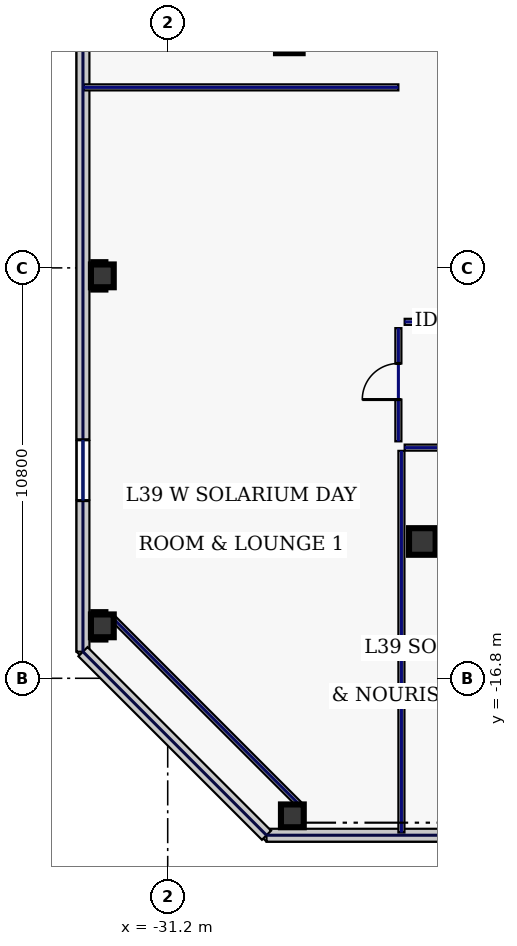
"""IFC4 building model, lengths in metres.
Left out: names, types, materials, properties, quantities, classifications, styles, units other than length and angle.
Written with IfcOpenShell. Run it as: python <this file> out.ifc"""

import sys

from ifc_helpers import new_model, si_unit, direction, frame, frame_2d, origin, origin_2d, place, context, subcontext, project, spatial, rectangle, hollow_rectangle, extrude, element, fill, save


model = new_model("IFC4")
c1 = context("Model", 3, precision=1e-05, world=origin(), true_north=direction((0.0, 1.0)))
c2 = subcontext(c1, "Body", "Model", "MODEL_VIEW")
j1 = project(units=[si_unit("LENGTHUNIT", "METRE"), si_unit("PLANEANGLEUNIT", "RADIAN")], contexts=[c1])
p1 = place(None, origin())
s1 = spatial("IfcSite", under=j1, at=p1, CompositionType="ELEMENT")
p2 = place(p1, origin())
s2 = spatial("IfcBuilding", under=s1, at=p2, CompositionType="ELEMENT")
p3 = place(p2, frame((0.0, 0.0, 172.2)))
s3 = spatial("IfcBuildingStorey", under=s2, at=p3, CompositionType="ELEMENT", Elevation=172.2)
for number, where, z_axis, x_axis in (
    (1, (-24.5, -13.2, 0.0), (0.0, 0.0, 1.0), (1.0, 0.0, 0.0)),
    (2, (-28.0, 0.0, 0.0), (0.0, 0.0, 1.0), (1.0, 0.0, 0.0)),
):
    element("IfcColumn", number, at=place(p3, frame(where, z_axis=z_axis, x_axis=x_axis)), inside=s3, PredefinedType="COLUMN", context=c2, shape_type="SweptSolid", body=[
        extrude(hollow_rectangle(XDim=0.7, YDim=0.7, WallThickness=0.032, at=origin_2d()), origin(), (0.0, 0.0, 1.0), 3.74),
    ])
for number, where, z_axis, x_axis in (
    (3, (-27.92, -20.42, 0.0), (0.0, 0.0, 1.0), (1.0, 0.0, 0.0)),
    (4, (-32.92, -6.21, 0.0), (0.0, 0.0, 1.0), (1.0, 0.0, 0.0)),
    (5, (-32.92, -15.42, 0.0), (0.0, 0.0, 1.0), (1.0, 0.0, 0.0)),
):
    element("IfcColumn", number, at=place(p3, frame(where, z_axis=z_axis, x_axis=x_axis)), inside=s3, PredefinedType="COLUMN", context=c2, shape_type="SweptSolid", body=[
        extrude(hollow_rectangle(XDim=0.6, YDim=0.6, WallThickness=0.028, at=origin_2d()), origin(), (0.0, 0.0, 1.0), 3.74),
    ])
p4 = place(p3, frame((-28.6, -20.93, 0.0), z_axis=(0.0, 0.0, 1.0), x_axis=(1.0, 0.0, 0.0)))
e6 = element("IfcWall", 6, at=p4, inside=s3, PredefinedType="STANDARD", context=c2, shape_type="SweptSolid", body=[
    extrude(rectangle(XDim=19.937, YDim=0.34, at=frame_2d((9.969, 0.0))), origin(), (0.0, 0.0, 1.0), 3.74),
])
p5 = place(p4, frame((10.882, 0.0, 0.22)))
e7 = element("IfcOpeningElement", 7, at=p5, cuts=e6, PredefinedType="OPENING", context=c2, shape_type="SweptSolid", body=[
    extrude(rectangle(XDim=1.6, YDim=1.2, at=frame_2d((0.8, 0.6))), frame((0.0, 0.18, 0.0), z_axis=(0.0, -1.0, 0.0), x_axis=(1.0, 0.0, 0.0)), (0.0, 0.0, 1.0), 0.36),
])
p6 = place(p3, frame((-33.43, 22.1, 0.0), z_axis=(0.0, 0.0, 1.0), x_axis=(0.0, -1.0, 0.0)))
e8 = element("IfcWall", 8, at=p6, inside=s3, PredefinedType="STANDARD", context=c2, shape_type="SweptSolid", body=[
    extrude(rectangle(XDim=38.2, YDim=0.34, at=frame_2d((19.1, 0.0))), origin(), (0.0, 0.0, 1.0), 3.74),
])
p7 = place(p6, frame((3.975, 0.0, 0.22)))
e9 = element("IfcOpeningElement", 9, at=p7, cuts=e8, PredefinedType="OPENING", context=c2, shape_type="SweptSolid", body=[
    extrude(rectangle(XDim=1.6, YDim=1.2, at=frame_2d((0.8, 0.6))), frame((0.0, 0.18, 0.0), z_axis=(0.0, -1.0, 0.0), x_axis=(1.0, 0.0, 0.0)), (0.0, 0.0, 1.0), 0.36),
])
p8 = place(p6, frame((13.525, 0.0, 0.22)))
e10 = element("IfcOpeningElement", 10, at=p8, cuts=e8, PredefinedType="OPENING", context=c2, shape_type="SweptSolid", body=[
    extrude(rectangle(XDim=1.6, YDim=1.2, at=frame_2d((0.8, 0.6))), frame((0.0, 0.18, 0.0), z_axis=(0.0, -1.0, 0.0), x_axis=(1.0, 0.0, 0.0)), (0.0, 0.0, 1.0), 0.36),
])
p9 = place(p6, frame((32.625, 0.0, 0.22)))
e11 = element("IfcOpeningElement", 11, at=p9, cuts=e8, PredefinedType="OPENING", context=c2, shape_type="SweptSolid", body=[
    extrude(rectangle(XDim=1.6, YDim=1.2, at=frame_2d((0.8, 0.6))), frame((0.0, 0.18, 0.0), z_axis=(0.0, -1.0, 0.0), x_axis=(1.0, 0.0, 0.0)), (0.0, 0.0, 1.0), 0.36),
])
p10 = place(p3, frame((-33.43, -16.1, 0.0), z_axis=(0.0, 0.0, 1.0), x_axis=(0.707106781187, -0.707106781187, 0.0)))
e12 = element("IfcWall", 12, at=p10, inside=s3, PredefinedType="STANDARD", context=c2, shape_type="SweptSolid", body=[
    extrude(rectangle(XDim=6.83, YDim=0.34, at=frame_2d((3.415, 0.0))), origin(), (0.0, 0.0, 1.0), 3.74),
])
p11 = place(p3, frame((-32.68, -15.18, 0.0), z_axis=(0.0, 0.0, 1.0), x_axis=(0.707106781187, -0.707106781187, 0.0)))
e13 = element("IfcWall", 13, at=p11, inside=s3, PredefinedType="PARTITIONING", context=c2, shape_type="SweptSolid", body=[
    extrude(rectangle(XDim=7.071, YDim=0.16, at=frame_2d((3.536, 0.0))), origin(), (0.0, 0.0, 1.0), 1.535),
])
p12 = place(p3, frame((-25.13, -10.565, 0.0), z_axis=(0.0, 0.0, 1.0), x_axis=(0.0, 1.0, 0.0)))
e14 = element("IfcWall", 14, at=p12, inside=s3, PredefinedType="PARTITIONING", context=c2, shape_type="SweptSolid", body=[
    extrude(rectangle(XDim=2.98, YDim=0.16, at=frame_2d((1.49, 0.0))), origin(), (0.0, 0.0, 1.0), 3.74),
])
p13 = place(p12, frame((1.1, 0.0, 0.0)))
e15 = element("IfcOpeningElement", 15, at=p13, cuts=e14, PredefinedType="OPENING", context=c2, shape_type="SweptSolid", body=[
    extrude(rectangle(XDim=0.95, YDim=2.2, at=frame_2d((0.475, 1.1))), frame((0.0, 0.09, 0.0), z_axis=(0.0, -1.0, 0.0), x_axis=(1.0, 0.0, 0.0)), (0.0, 0.0, 1.0), 0.18),
])
p14 = place(p3, frame((-24.965, -7.42, 0.0), z_axis=(0.0, 0.0, 1.0), x_axis=(1.0, 0.0, 0.0)))
e16 = element("IfcWall", 16, at=p14, inside=s3, PredefinedType="PARTITIONING", context=c2, shape_type="SweptSolid", body=[
    extrude(rectangle(XDim=14.25, YDim=0.16, at=frame_2d((7.125, 0.0))), origin(), (0.0, 0.0, 1.0), 3.74),
])
p15 = place(p3, frame((24.965, -10.73, 0.0), z_axis=(0.0, 0.0, 1.0), x_axis=(-1.0, 0.0, 0.0)))
e17 = element("IfcWall", 17, at=p15, inside=s3, PredefinedType="PARTITIONING", context=c2, shape_type="SweptSolid", body=[
    extrude(rectangle(XDim=49.93, YDim=0.16, at=frame_2d((24.965, 0.0))), origin(), (0.0, 0.0, 1.0), 3.74),
])
p16 = place(p15, frame((47.106, 0.0, 0.0)))
e18 = element("IfcOpeningElement", 18, at=p16, cuts=e17, PredefinedType="OPENING", context=c2, shape_type="SweptSolid", body=[
    extrude(rectangle(XDim=0.95, YDim=2.2, at=frame_2d((0.475, 1.1))), frame((0.0, 0.09, 0.0), z_axis=(0.0, -1.0, 0.0), x_axis=(1.0, 0.0, 0.0)), (0.0, 0.0, 1.0), 0.18),
])
p17 = place(p15, frame((40.775, 0.0, 0.0)))
e19 = element("IfcOpeningElement", 19, at=p17, cuts=e17, PredefinedType="OPENING", context=c2, shape_type="SweptSolid", body=[
    extrude(rectangle(XDim=1.45, YDim=2.2, at=frame_2d((0.725, 1.1))), frame((0.0, 0.09, 0.0), z_axis=(0.0, -1.0, 0.0), x_axis=(1.0, 0.0, 0.0)), (0.0, 0.0, 1.0), 0.18),
])
p18 = place(p15, frame((33.175, 0.0, 0.0)))
e20 = element("IfcOpeningElement", 20, at=p18, cuts=e17, PredefinedType="OPENING", context=c2, shape_type="SweptSolid", body=[
    extrude(rectangle(XDim=1.3, YDim=2.2, at=frame_2d((0.65, 1.1))), frame((0.0, 0.09, 0.0), z_axis=(0.0, -1.0, 0.0), x_axis=(1.0, 0.0, 0.0)), (0.0, 0.0, 1.0), 0.18),
])
p19 = place(p15, frame((25.425, 0.0, 0.0)))
e21 = element("IfcOpeningElement", 21, at=p19, cuts=e17, PredefinedType="OPENING", context=c2, shape_type="SweptSolid", body=[
    extrude(rectangle(XDim=1.3, YDim=2.2, at=frame_2d((0.65, 1.1))), frame((0.0, 0.09, 0.0), z_axis=(0.0, -1.0, 0.0), x_axis=(1.0, 0.0, 0.0)), (0.0, 0.0, 1.0), 0.18),
])
p20 = place(p15, frame((17.7, 0.0, 0.0)))
e22 = element("IfcOpeningElement", 22, at=p20, cuts=e17, PredefinedType="OPENING", context=c2, shape_type="SweptSolid", body=[
    extrude(rectangle(XDim=1.15, YDim=2.2, at=frame_2d((0.575, 1.1))), frame((0.0, 0.09, 0.0), z_axis=(0.0, -1.0, 0.0), x_axis=(1.0, 0.0, 0.0)), (0.0, 0.0, 1.0), 0.18),
])
p21 = place(p15, frame((9.075, 0.0, 0.0)))
e23 = element("IfcOpeningElement", 23, at=p21, cuts=e17, PredefinedType="OPENING", context=c2, shape_type="SweptSolid", body=[
    extrude(rectangle(XDim=0.95, YDim=2.2, at=frame_2d((0.475, 1.1))), frame((0.0, 0.09, 0.0), z_axis=(0.0, -1.0, 0.0), x_axis=(1.0, 0.0, 0.0)), (0.0, 0.0, 1.0), 0.18),
])
p22 = place(p15, frame((2.044, 0.0, 0.0)))
e24 = element("IfcOpeningElement", 24, at=p22, cuts=e17, PredefinedType="OPENING", context=c2, shape_type="SweptSolid", body=[
    extrude(rectangle(XDim=1.05, YDim=2.2, at=frame_2d((0.525, 1.1))), frame((0.0, 0.09, 0.0), z_axis=(0.0, -1.0, 0.0), x_axis=(1.0, 0.0, 0.0)), (0.0, 0.0, 1.0), 0.18),
])
p23 = place(p3, frame((-25.05, -20.86, 0.0), z_axis=(0.0, 0.0, 1.0), x_axis=(0.0, 1.0, 0.0)))
e25 = element("IfcWall", 25, at=p23, inside=s3, PredefinedType="PARTITIONING", context=c2, shape_type="SweptSolid", body=[
    extrude(rectangle(XDim=10.045, YDim=0.16, at=frame_2d((5.022, 0.0))), origin(), (0.0, 0.0, 1.0), 3.74),
])
p24 = place(p3, frame((-33.41, -1.25, 0.0), z_axis=(0.0, 0.0, 1.0), x_axis=(1.0, 0.0, 0.0)))
e26 = element("IfcWall", 26, at=p24, inside=s3, PredefinedType="PARTITIONING", context=c2, shape_type="SweptSolid", body=[
    extrude(rectangle(XDim=8.28, YDim=0.16, at=frame_2d((4.14, 0.0))), origin(), (0.0, 0.0, 1.0), 3.74),
])
p25 = place(p9, origin())
e27 = element("IfcWindow", 27, at=p25, inside=s3, PartitioningType="SINGLE_PANEL", PredefinedType="WINDOW", context=c2, shape_type="SweptSolid", body=[
    extrude(rectangle(XDim=1.6, YDim=1.2, at=frame_2d((0.8, 0.6))), frame((0.0, 0.03, 0.0), z_axis=(0.0, -1.0, 0.0), x_axis=(1.0, 0.0, 0.0)), (0.0, 0.0, 1.0), 0.06),
])
fill(e11, e27)
p26 = place(p13, origin())
e28 = element("IfcDoor", 28, at=p26, inside=s3, OperationType="SINGLE_SWING_LEFT", PredefinedType="DOOR", context=c2, shape_type="SweptSolid", body=[
    extrude(rectangle(XDim=0.95, YDim=2.2, at=frame_2d((0.475, 1.1))), frame((0.0, 0.025, 0.0), z_axis=(0.0, -1.0, 0.0), x_axis=(1.0, 0.0, 0.0)), (0.0, 0.0, 1.0), 0.05),
])
fill(e15, e28)
save(model, sys.argv[1])
